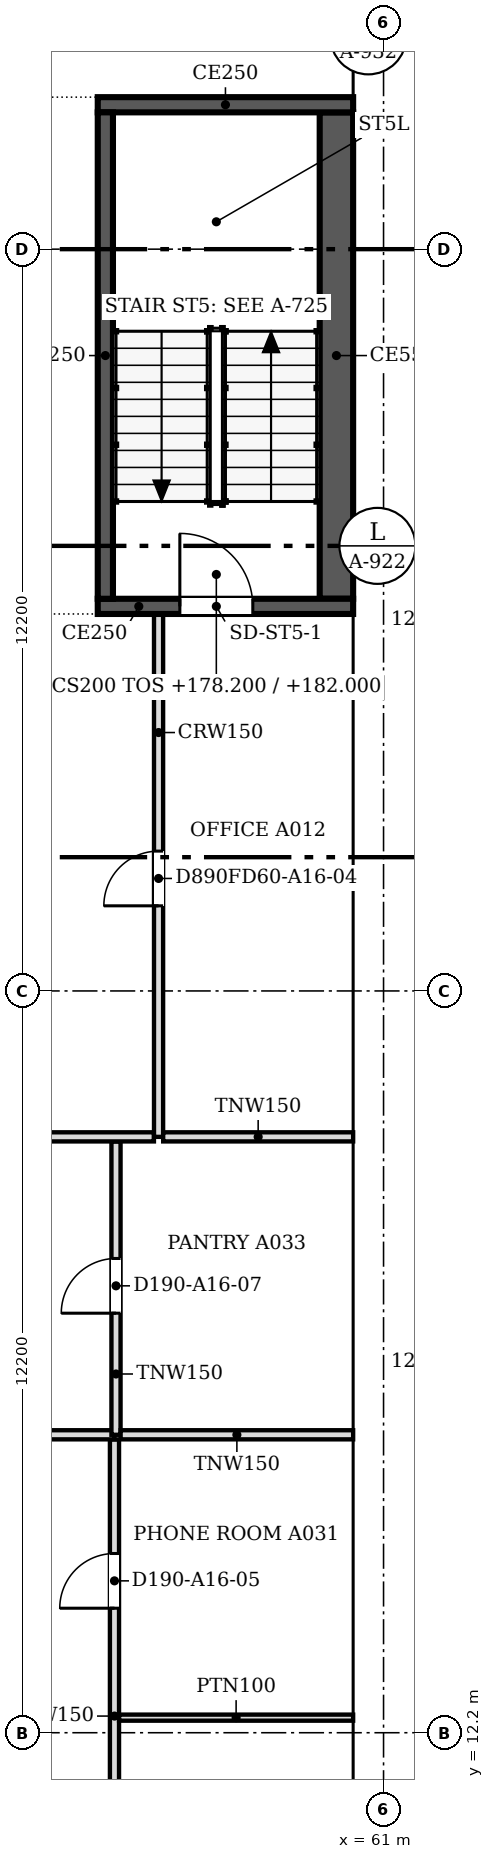
"""IFC4 building model, lengths in metres.
Left out: names, types, materials, properties, quantities, classifications, styles, units other than length and angle.
Written with IfcOpenShell. Run it as: python <this file> out.ifc"""

import sys

from ifc_helpers import new_model, si_unit, direction, frame, frame_2d, origin, place, context, subcontext, project, spatial, polyline, rectangle, outline, extrude, faceted_brep, source, transform, mapped, element, fill, save


model = new_model("IFC4")
c1 = context("Model", 3, precision=1e-05, world=origin(), true_north=direction((0.0, 1.0)))
c2 = subcontext(c1, "Body", "Model", "MODEL_VIEW")
j1 = project(units=[si_unit("LENGTHUNIT", "METRE"), si_unit("PLANEANGLEUNIT", "RADIAN")], contexts=[c1])
p1 = place(None, origin())
s1 = spatial("IfcSite", under=j1, at=p1, CompositionType="ELEMENT")
p2 = place(p1, origin())
s2 = spatial("IfcBuilding", under=s1, at=p2, CompositionType="ELEMENT")
p3 = place(p2, frame((0.0, 0.0, 178.2)))
s3 = spatial("IfcBuildingStorey", under=s2, at=p3, CompositionType="ELEMENT", Elevation=178.2)
m1 = source(origin(), c2, "Body", "Brep", [
    faceted_brep([(3.003, -0.25, 0.0), (6.053, -0.25, 3.8), (3.003, -0.25, 7.6), (0.0, -0.25, 3.8), (0.047, 0.25, 3.859), (3.003, 0.25, 7.6), (6.053, 0.25, 3.8), (3.003, 0.25, 0.0), (0.047, 0.25, 3.741), (0.0, 0.0, 3.8)], [[[0, 1, 2, 3]], [[4, 5, 6, 7, 8]], [[7, 6, 1, 0]], [[6, 5, 2, 1]], [[5, 4, 9, 3, 2]], [[8, 7, 0, 3, 9]], [[8, 9, 4]]]),
])
p4 = place(p3, frame((60.75, 6.146, -3.8), z_axis=(0.0, 0.0, 1.0), x_axis=(0.0, 1.0, 0.0)))
e1 = element("IfcWall", 1, at=p4, inside=s3, PredefinedType="SOLIDWALL", context=c2, shape_type="MappedRepresentation", body=[
    mapped(m1, transform((0.0, 0.0, 0.0), scale=1.0)),
])
m2 = source(origin(), c2, "Body", "SweptSolid", [
    extrude(outline(polyline([(3.005, 0.401), (5.733, 3.8), (3.005, 7.199), (0.319, 3.8), (3.005, 0.401)])), frame((0.0, 0.26, 0.0), z_axis=(0.0, -1.0, 0.0), x_axis=(1.0, 0.0, 0.0)), (0.0, 0.0, 1.0), 0.52),
])
p5 = place(p4, origin())
e2 = element("IfcOpeningElement", 2, at=p5, cuts=e1, PredefinedType="OPENING", context=c2, shape_type="MappedRepresentation", body=[
    mapped(m2, transform((0.0, 0.0, 0.0), scale=1.0)),
])
m3 = source(origin(), c2, "Body", "SweptSolid", [
    extrude(outline(polyline([(3.05, 0.0), (6.1, 3.8), (3.05, 7.6), (0.0, 3.8), (3.05, 0.0)])), frame((0.0, 0.25, 0.0), z_axis=(0.0, -1.0, 0.0), x_axis=(1.0, 0.0, 0.0)), (0.0, 0.0, 1.0), 0.5),
])
p6 = place(p3, frame((60.75, 12.2, -3.8), z_axis=(0.0, 0.0, 1.0), x_axis=(0.0, 1.0, 0.0)))
e3 = element("IfcWall", 3, at=p6, inside=s3, PredefinedType="SOLIDWALL", context=c2, shape_type="MappedRepresentation", body=[
    mapped(m3, transform((0.0, 0.0, 0.0), scale=1.0)),
])
m4 = source(origin(), c2, "Body", "SweptSolid", [
    extrude(outline(polyline([(3.05, 0.399), (5.78, 3.8), (3.05, 7.201), (0.321, 3.8), (3.05, 0.399)])), frame((0.0, 0.26, 0.0), z_axis=(0.0, -1.0, 0.0), x_axis=(1.0, 0.0, 0.0)), (0.0, 0.0, 1.0), 0.52),
])
p7 = place(p6, origin())
e4 = element("IfcOpeningElement", 4, at=p7, cuts=e3, PredefinedType="OPENING", context=c2, shape_type="MappedRepresentation", body=[
    mapped(m4, transform((0.0, 0.0, 0.0), scale=1.0)),
])
m5 = source(origin(), c2, "Body", "Brep", [
    faceted_brep([(3.05, -0.25, 0.0), (6.1, -0.25, 3.8), (6.1, -0.25, 3.8), (3.05, -0.25, 7.6), (0.0, -0.25, 3.8), (0.0, 0.25, 3.8), (3.05, 0.25, 7.6), (6.1, 0.25, 3.8), (6.1, 0.25, 3.8), (3.05, 0.25, 0.0)], [[[0, 1, 2, 3, 4]], [[5, 6, 7, 8, 9]], [[9, 8, 1, 0]], [[7, 6, 3, 2]], [[6, 5, 4, 3]], [[5, 9, 0, 4]], [[1, 8, 7, 2]]]),
])
p8 = place(p3, frame((60.75, 18.3, -3.8), z_axis=(0.0, 0.0, 1.0), x_axis=(0.0, 1.0, 0.0)))
e5 = element("IfcWall", 5, at=p8, inside=s3, PredefinedType="SOLIDWALL", context=c2, shape_type="MappedRepresentation", body=[
    mapped(m5, transform((0.0, 0.0, 0.0), scale=1.0)),
])
p9 = place(p8, origin())
e6 = element("IfcOpeningElement", 6, at=p9, cuts=e5, PredefinedType="OPENING", context=c2, shape_type="MappedRepresentation", body=[
    mapped(m4, transform((0.0, 0.0, 0.0), scale=1.0)),
])
p10 = place(p3, frame((60.75, 24.4, -3.8), z_axis=(0.0, 0.0, 1.0), x_axis=(0.0, 1.0, 0.0)))
e7 = element("IfcWall", 7, at=p10, inside=s3, PredefinedType="SOLIDWALL", context=c2, shape_type="MappedRepresentation", body=[
    mapped(m3, transform((0.0, 0.0, 0.0), scale=1.0)),
])
p11 = place(p10, origin())
e8 = element("IfcOpeningElement", 8, at=p11, cuts=e7, PredefinedType="OPENING", context=c2, shape_type="MappedRepresentation", body=[
    mapped(m4, transform((0.0, 0.0, 0.0), scale=1.0)),
])
p12 = place(p3, frame((60.75, 30.5, -3.8), z_axis=(0.0, 0.0, 1.0), x_axis=(0.0, 1.0, 0.0)))
e9 = element("IfcWall", 9, at=p12, inside=s3, PredefinedType="SOLIDWALL", context=c2, shape_type="MappedRepresentation", body=[
    mapped(m3, transform((0.0, 0.0, 0.0), scale=1.0)),
])
p13 = place(p12, origin())
e10 = element("IfcOpeningElement", 10, at=p13, cuts=e9, PredefinedType="OPENING", context=c2, shape_type="MappedRepresentation", body=[
    mapped(m4, transform((0.0, 0.0, 0.0), scale=1.0)),
])
p14 = place(p3, frame((60.75, 36.6, -3.8), z_axis=(0.0, 0.0, 1.0), x_axis=(0.0, 1.0, 0.0)))
e11 = element("IfcWall", 11, at=p14, inside=s3, PredefinedType="SOLIDWALL", context=c2, shape_type="MappedRepresentation", body=[
    mapped(m5, transform((0.0, 0.0, 0.0), scale=1.0)),
])
p15 = place(p14, origin())
e12 = element("IfcOpeningElement", 12, at=p15, cuts=e11, PredefinedType="OPENING", context=c2, shape_type="MappedRepresentation", body=[
    mapped(m4, transform((0.0, 0.0, 0.0), scale=1.0)),
])
p16 = place(p2, frame((0.0, 0.0, 182.0)))
s4 = spatial("IfcBuildingStorey", under=s2, at=p16, CompositionType="ELEMENT", Elevation=182.0)
p17 = place(p16, frame((60.75, 9.15, -3.8), z_axis=(0.0, 0.0, 1.0), x_axis=(0.0, 1.0, 0.0)))
e13 = element("IfcWall", 13, at=p17, inside=s4, PredefinedType="SOLIDWALL", context=c2, shape_type="MappedRepresentation", body=[
    mapped(m3, transform((0.0, 0.0, 0.0), scale=1.0)),
])
p18 = place(p17, origin())
e14 = element("IfcOpeningElement", 14, at=p18, cuts=e13, PredefinedType="OPENING", context=c2, shape_type="MappedRepresentation", body=[
    mapped(m4, transform((0.0, 0.0, 0.0), scale=1.0)),
])
p19 = place(p16, frame((60.75, 15.25, -3.8), z_axis=(0.0, 0.0, 1.0), x_axis=(0.0, 1.0, 0.0)))
e15 = element("IfcWall", 15, at=p19, inside=s4, PredefinedType="SOLIDWALL", context=c2, shape_type="MappedRepresentation", body=[
    mapped(m3, transform((0.0, 0.0, 0.0), scale=1.0)),
])
p20 = place(p19, origin())
e16 = element("IfcOpeningElement", 16, at=p20, cuts=e15, PredefinedType="OPENING", context=c2, shape_type="MappedRepresentation", body=[
    mapped(m4, transform((0.0, 0.0, 0.0), scale=1.0)),
])
p21 = place(p16, frame((60.75, 21.35, -3.8), z_axis=(0.0, 0.0, 1.0), x_axis=(0.0, 1.0, 0.0)))
e17 = element("IfcWall", 17, at=p21, inside=s4, PredefinedType="SOLIDWALL", context=c2, shape_type="MappedRepresentation", body=[
    mapped(m5, transform((0.0, 0.0, 0.0), scale=1.0)),
])
p22 = place(p21, origin())
e18 = element("IfcOpeningElement", 18, at=p22, cuts=e17, PredefinedType="OPENING", context=c2, shape_type="MappedRepresentation", body=[
    mapped(m4, transform((0.0, 0.0, 0.0), scale=1.0)),
])
p23 = place(p16, frame((60.75, 27.45, -3.8), z_axis=(0.0, 0.0, 1.0), x_axis=(0.0, 1.0, 0.0)))
e19 = element("IfcWall", 19, at=p23, inside=s4, PredefinedType="SOLIDWALL", context=c2, shape_type="MappedRepresentation", body=[
    mapped(m3, transform((0.0, 0.0, 0.0), scale=1.0)),
])
p24 = place(p23, origin())
e20 = element("IfcOpeningElement", 20, at=p24, cuts=e19, PredefinedType="OPENING", context=c2, shape_type="MappedRepresentation", body=[
    mapped(m4, transform((0.0, 0.0, 0.0), scale=1.0)),
])
p25 = place(p16, frame((60.75, 33.55, -3.8), z_axis=(0.0, 0.0, 1.0), x_axis=(0.0, 1.0, 0.0)))
e21 = element("IfcWall", 21, at=p25, inside=s4, PredefinedType="SOLIDWALL", context=c2, shape_type="MappedRepresentation", body=[
    mapped(m5, transform((0.0, 0.0, 0.0), scale=1.0)),
])
p26 = place(p25, origin())
e22 = element("IfcOpeningElement", 22, at=p26, cuts=e21, PredefinedType="OPENING", context=c2, shape_type="MappedRepresentation", body=[
    mapped(m4, transform((0.0, 0.0, 0.0), scale=1.0)),
])
p27 = place(p16, frame((60.75, 39.65, -3.8), z_axis=(0.0, 0.0, 1.0), x_axis=(0.0, 1.0, 0.0)))
e23 = element("IfcWall", 23, at=p27, inside=s4, PredefinedType="SOLIDWALL", context=c2, shape_type="MappedRepresentation", body=[
    mapped(m3, transform((0.0, 0.0, 0.0), scale=1.0)),
])
p28 = place(p27, origin())
e24 = element("IfcOpeningElement", 24, at=p28, cuts=e23, PredefinedType="OPENING", context=c2, shape_type="MappedRepresentation", body=[
    mapped(m4, transform((0.0, 0.0, 0.0), scale=1.0)),
])
p29 = place(p3, frame((60.5, 30.725, 0.0), z_axis=(0.0, 0.0, 1.0), x_axis=(-1.0, 0.0, 0.0)))
e25 = element("IfcWall", 25, at=p29, inside=s3, PredefinedType="SOLIDWALL", context=c2, shape_type="SweptSolid", body=[
    extrude(rectangle(XDim=4.2, YDim=0.25, at=frame_2d((2.1, 0.0))), origin(), (0.0, 0.0, 1.0), 3.8),
])
m6 = source(origin(), c2, "Body", "SweptSolid", [
    extrude(rectangle(XDim=1.2, YDim=2.1, at=frame_2d((0.6, 1.05))), frame((0.0, 0.135, 0.0), z_axis=(0.0, -1.0, 0.0), x_axis=(1.0, 0.0, 0.0)), (0.0, 0.0, 1.0), 0.27),
])
p30 = place(p29, frame((1.65, 0.0, 0.0)))
e26 = element("IfcOpeningElement", 26, at=p30, cuts=e25, PredefinedType="OPENING", context=c2, shape_type="MappedRepresentation", body=[
    mapped(m6, transform((0.0, 0.0, 0.0), scale=1.0)),
])
p31 = place(p3, frame((56.425, 30.85, 0.0), z_axis=(0.0, 0.0, 1.0), x_axis=(0.0, 1.0, 0.0)))
e27 = element("IfcWall", 27, at=p31, inside=s3, PredefinedType="SOLIDWALL", context=c2, shape_type="SweptSolid", body=[
    extrude(rectangle(XDim=8.0, YDim=0.25, at=frame_2d((4.0, 0.0))), origin(), (0.0, 0.0, 1.0), 3.8),
])
p32 = place(p3, frame((56.3, 38.975, 0.0), z_axis=(0.0, 0.0, 1.0), x_axis=(1.0, 0.0, 0.0)))
e28 = element("IfcWall", 28, at=p32, inside=s3, PredefinedType="SOLIDWALL", context=c2, shape_type="SweptSolid", body=[
    extrude(rectangle(XDim=4.2, YDim=0.25, at=frame_2d((2.1, 0.0))), origin(), (0.0, 0.0, 1.0), 3.8),
])
p33 = place(p3, frame((60.225, 38.85, 0.0), z_axis=(0.0, 0.0, 1.0), x_axis=(0.0, -1.0, 0.0)))
e29 = element("IfcWall", 29, at=p33, inside=s3, PredefinedType="SOLIDWALL", context=c2, shape_type="SweptSolid", body=[
    extrude(rectangle(XDim=8.0, YDim=0.55, at=frame_2d((4.0, 0.0))), origin(), (0.0, 0.0, 1.0), 3.8),
])
p34 = place(p3, frame((56.575, 17.024, 0.0), z_axis=(0.0, 0.0, 1.0), x_axis=(0.0, -1.0, 0.0)))
e30 = element("IfcWall", 30, at=p34, inside=s3, PredefinedType="PARTITIONING", context=c2, shape_type="SweptSolid", body=[
    extrude(rectangle(XDim=8.924, YDim=0.15, at=frame_2d((4.462, 0.0))), origin(), (0.0, 0.0, 1.0), 3.067),
])
m7 = source(origin(), c2, "Body", "SweptSolid", [
    extrude(rectangle(XDim=0.9, YDim=2.1, at=frame_2d((0.45, 1.05))), frame((0.0, 0.085, 0.0), z_axis=(0.0, -1.0, 0.0), x_axis=(1.0, 0.0, 0.0)), (0.0, 0.0, 1.0), 0.17),
])
p35 = place(p34, frame((6.324, 0.0, 0.0)))
e31 = element("IfcOpeningElement", 31, at=p35, cuts=e30, PredefinedType="OPENING", context=c2, shape_type="MappedRepresentation", body=[
    mapped(m7, transform((0.0, 0.0, 0.0), scale=1.0)),
])
p36 = place(p34, frame((1.876, 0.0, 0.0)))
e32 = element("IfcOpeningElement", 32, at=p36, cuts=e30, PredefinedType="OPENING", context=c2, shape_type="MappedRepresentation", body=[
    mapped(m7, transform((0.0, 0.0, 0.0), scale=1.0)),
])
p37 = place(p3, frame((56.651, 12.448, 0.0), z_axis=(0.0, 0.0, 1.0), x_axis=(1.0, 0.0, 0.0)))
e33 = element("IfcWall", 33, at=p37, inside=s3, PredefinedType="PARTITIONING", context=c2, shape_type="SweptSolid", body=[
    extrude(rectangle(XDim=3.849, YDim=0.1, at=frame_2d((1.925, 0.0))), origin(), (0.0, 0.0, 1.0), 3.067),
])
p38 = place(p3, frame((46.476, 17.1, 0.0), z_axis=(0.0, 0.0, 1.0), x_axis=(1.0, 0.0, 0.0)))
e34 = element("IfcWall", 34, at=p38, inside=s3, PredefinedType="PARTITIONING", context=c2, shape_type="SweptSolid", body=[
    extrude(rectangle(XDim=10.099, YDim=0.15, at=frame_2d((5.049, 0.0))), origin(), (0.0, 0.0, 1.0), 3.067),
])
p39 = place(p3, frame((56.6, 21.924, 0.0), z_axis=(0.0, 0.0, 1.0), x_axis=(0.0, -1.0, 0.0)))
e35 = element("IfcWall", 35, at=p39, inside=s3, PredefinedType="PARTITIONING", context=c2, shape_type="SweptSolid", body=[
    extrude(rectangle(XDim=4.824, YDim=0.15, at=frame_2d((2.412, 0.0))), origin(), (0.0, 0.0, 1.0), 3.067),
])
p40 = place(p39, frame((1.924, 0.0, 0.0)))
e36 = element("IfcOpeningElement", 36, at=p40, cuts=e35, PredefinedType="OPENING", context=c2, shape_type="MappedRepresentation", body=[
    mapped(m7, transform((0.0, 0.0, 0.0), scale=1.0)),
])
p41 = place(p3, frame((56.676, 17.1, 0.0), z_axis=(0.0, 0.0, 1.0), x_axis=(1.0, 0.0, 0.0)))
e37 = element("IfcWall", 37, at=p41, inside=s3, PredefinedType="PARTITIONING", context=c2, shape_type="SweptSolid", body=[
    extrude(rectangle(XDim=3.824, YDim=0.15, at=frame_2d((1.912, 0.0))), origin(), (0.0, 0.0, 1.0), 3.067),
])
p42 = place(p3, frame((46.4, 22.0, 0.0), z_axis=(0.0, 0.0, 1.0), x_axis=(1.0, 0.0, 0.0)))
e38 = element("IfcWall", 38, at=p42, inside=s3, PredefinedType="PARTITIONING", context=c2, shape_type="SweptSolid", body=[
    extrude(rectangle(XDim=10.824, YDim=0.15, at=frame_2d((5.412, 0.0))), origin(), (0.0, 0.0, 1.0), 3.067),
])
p43 = place(p3, frame((57.3, 30.6, 0.0), z_axis=(0.0, 0.0, 1.0), x_axis=(0.0, -1.0, 0.0)))
e39 = element("IfcWall", 39, at=p43, inside=s3, PredefinedType="PARTITIONING", context=c2, shape_type="SweptSolid", body=[
    extrude(rectangle(XDim=8.6, YDim=0.15, at=frame_2d((4.3, 0.0))), origin(), (0.0, 0.0, 1.0), 3.067),
])
p44 = place(p43, frame((3.9, 0.0, 0.0)))
e40 = element("IfcOpeningElement", 40, at=p44, cuts=e39, PredefinedType="OPENING", context=c2, shape_type="MappedRepresentation", body=[
    mapped(m7, transform((0.0, 0.0, 0.0), scale=1.0)),
])
p45 = place(p3, frame((57.376, 22.0, 0.0), z_axis=(0.0, 0.0, 1.0), x_axis=(1.0, 0.0, 0.0)))
e41 = element("IfcWall", 41, at=p45, inside=s3, PredefinedType="PARTITIONING", context=c2, shape_type="SweptSolid", body=[
    extrude(rectangle(XDim=3.124, YDim=0.15, at=frame_2d((1.562, 0.0))), origin(), (0.0, 0.0, 1.0), 3.067),
])
m8 = source(origin(), c2, "Body", "SweptSolid", [
    extrude(rectangle(XDim=1.2, YDim=2.1, at=frame_2d((0.6, 1.05))), frame((0.0, 0.025, 0.0), z_axis=(0.0, -1.0, 0.0), x_axis=(1.0, 0.0, 0.0)), (0.0, 0.0, 1.0), 0.05),
])
p46 = place(p30, origin())
e42 = element("IfcDoor", 42, at=p46, inside=s3, OperationType="SINGLE_SWING_RIGHT", PredefinedType="DOOR", context=c2, shape_type="MappedRepresentation", body=[
    mapped(m8, transform((0.0, 0.0, 0.0), scale=1.0)),
])
fill(e26, e42)
m9 = source(origin(), c2, "Body", "SweptSolid", [
    extrude(rectangle(XDim=0.9, YDim=2.1, at=frame_2d((0.45, 1.05))), frame((0.0, 0.025, 0.0), z_axis=(0.0, -1.0, 0.0), x_axis=(1.0, 0.0, 0.0)), (0.0, 0.0, 1.0), 0.05),
])
p47 = place(p36, origin())
e43 = element("IfcDoor", 43, at=p47, inside=s3, OperationType="SINGLE_SWING_RIGHT", PredefinedType="DOOR", context=c2, shape_type="MappedRepresentation", body=[
    mapped(m9, transform((0.0, 0.0, 0.0), scale=1.0)),
])
fill(e32, e43)
p48 = place(p40, origin())
e44 = element("IfcDoor", 44, at=p48, inside=s3, OperationType="SINGLE_SWING_RIGHT", PredefinedType="DOOR", context=c2, shape_type="MappedRepresentation", body=[
    mapped(m9, transform((0.0, 0.0, 0.0), scale=1.0)),
])
fill(e36, e44)
p49 = place(p44, origin())
e45 = element("IfcDoor", 45, at=p49, inside=s3, OperationType="SINGLE_SWING_RIGHT", PredefinedType="DOOR", context=c2, shape_type="MappedRepresentation", body=[
    mapped(m9, transform((0.0, 0.0, 0.0), scale=1.0)),
])
fill(e40, e45)
save(model, sys.argv[1])
